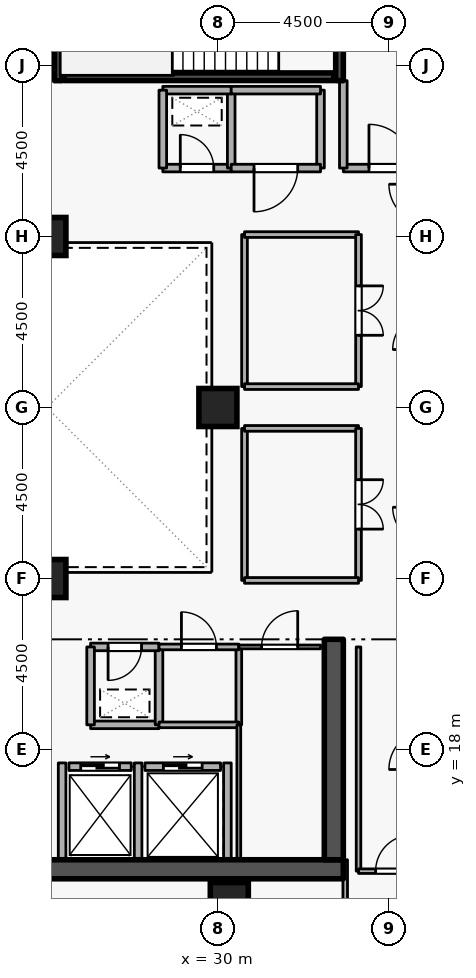
"""IFC4 building model, lengths in metres.
Left out: names, types, materials, properties, quantities, classifications, styles, units other than length and angle.
Written with IfcOpenShell. Run it as: python <this file> out.ifc"""

import sys

from ifc_helpers import new_model, si_unit, direction, frame, frame_2d, origin, origin_2d, place, context, subcontext, project, spatial, rectangle, extrude, element, fill, save


model = new_model("IFC4")
c1 = context("Model", 3, precision=1e-05, world=origin(), true_north=direction((0.0, 1.0)))
c2 = subcontext(c1, "Body", "Model", "MODEL_VIEW")
j1 = project(units=[si_unit("LENGTHUNIT", "METRE"), si_unit("PLANEANGLEUNIT", "RADIAN")], contexts=[c1])
p1 = place(None, origin())
s1 = spatial("IfcSite", under=j1, at=p1, CompositionType="ELEMENT")
p2 = place(p1, origin())
s2 = spatial("IfcBuilding", under=s1, at=p2, CompositionType="ELEMENT")
p3 = place(p2, frame((0.0, 0.0, 225.9)))
s3 = spatial("IfcBuildingStorey", under=s2, at=p3, CompositionType="ELEMENT", Elevation=225.9)
p4 = place(p3, frame((17.7, 14.85, 0.0), z_axis=(0.0, 0.0, 1.0), x_axis=(1.0, 0.0, 0.0)))
e1 = element("IfcWall", 1, at=p4, inside=s3, PredefinedType="SHEAR", context=c2, shape_type="SweptSolid", body=[
    extrude(rectangle(XDim=15.6, YDim=0.5, at=frame_2d((7.8, 0.0))), origin(), (0.0, 0.0, 1.0), 3.6),
])
p5 = place(p3, frame((33.05, 15.1, 0.0), z_axis=(0.0, 0.0, 1.0), x_axis=(0.0, 1.0, 0.0)))
e2 = element("IfcWall", 2, at=p5, inside=s3, PredefinedType="SHEAR", context=c2, shape_type="SweptSolid", body=[
    extrude(rectangle(XDim=5.8, YDim=0.5, at=frame_2d((2.9, 0.0))), origin(), (0.0, 0.0, 1.0), 3.6),
])
for number, where, z_axis, x_axis in (
    (3, (30.3, 14.0, 0.0), (0.0, 0.0, 1.0), (1.0, 0.0, 0.0)),
    (4, (25.5, 22.5, 0.0), (0.0, 0.0, 1.0), (1.0, 0.0, 0.0)),
    (5, (25.5, 31.5, 0.0), (0.0, 0.0, 1.0), (1.0, 0.0, 0.0)),
    (6, (30.0, 27.0, 0.0), (0.0, 0.0, 1.0), (1.0, 0.0, 0.0)),
):
    element("IfcColumn", number, at=place(p3, frame(where, z_axis=z_axis, x_axis=x_axis)), inside=s3, PredefinedType="COLUMN", context=c2, shape_type="SweptSolid", body=[
        extrude(rectangle(XDim=1.0, YDim=1.0, at=origin_2d()), origin(), (0.0, 0.0, 1.0), 3.6),
    ])
p6 = place(p3, frame((26.08, 17.55, 0.0), z_axis=(0.0, 0.0, 1.0), x_axis=(1.0, 0.0, 0.0)))
e7 = element("IfcWall", 7, at=p6, inside=s3, PredefinedType="STANDARD", context=c2, shape_type="SweptSolid", body=[
    extrude(rectangle(XDim=1.64, YDim=0.2, at=frame_2d((0.82, 0.0))), origin(), (0.0, 0.0, 1.0), 3.3),
])
p7 = place(p6, frame((0.31, 0.0, 0.0)))
e8 = element("IfcOpeningElement", 8, at=p7, cuts=e7, PredefinedType="OPENING", context=c2, shape_type="SweptSolid", body=[
    extrude(rectangle(XDim=1.02, YDim=2.06, at=frame_2d((0.51, 1.03))), frame((0.0, 0.11, 0.0), z_axis=(0.0, -1.0, 0.0), x_axis=(1.0, 0.0, 0.0)), (0.0, 0.0, 1.0), 0.22),
])
p8 = place(p3, frame((28.08, 17.55, 0.0), z_axis=(0.0, 0.0, 1.0), x_axis=(1.0, 0.0, 0.0)))
e9 = element("IfcWall", 9, at=p8, inside=s3, PredefinedType="STANDARD", context=c2, shape_type="SweptSolid", body=[
    extrude(rectangle(XDim=1.99, YDim=0.2, at=frame_2d((0.995, 0.0))), origin(), (0.0, 0.0, 1.0), 3.3),
])
p9 = place(p8, frame((0.485, 0.0, 0.0)))
e10 = element("IfcOpeningElement", 10, at=p9, cuts=e9, PredefinedType="OPENING", context=c2, shape_type="SweptSolid", body=[
    extrude(rectangle(XDim=1.02, YDim=2.06, at=frame_2d((0.51, 1.03))), frame((0.0, 0.11, 0.0), z_axis=(0.0, -1.0, 0.0), x_axis=(1.0, 0.0, 0.0)), (0.0, 0.0, 1.0), 0.22),
])
p10 = place(p3, frame((27.9, 15.112, 0.0), z_axis=(0.0, 0.0, 1.0), x_axis=(0.0, 1.0, 0.0)))
e11 = element("IfcWall", 11, at=p10, inside=s3, PredefinedType="STANDARD", context=c2, shape_type="SweptSolid", body=[
    extrude(rectangle(XDim=2.536, YDim=0.2, at=frame_2d((1.268, 0.0))), origin(), (0.0, 0.0, 1.0), 3.3),
])
p11 = place(p3, frame((25.9, 15.112, 0.0), z_axis=(0.0, 0.0, 1.0), x_axis=(0.0, 1.0, 0.0)))
e12 = element("IfcWall", 12, at=p11, inside=s3, PredefinedType="STANDARD", context=c2, shape_type="SweptSolid", body=[
    extrude(rectangle(XDim=2.536, YDim=0.2, at=frame_2d((1.268, 0.0))), origin(), (0.0, 0.0, 1.0), 1.785),
])
p12 = place(p3, frame((30.25, 15.112, 0.0), z_axis=(0.0, 0.0, 1.0), x_axis=(0.0, 1.0, 0.0)))
e13 = element("IfcWall", 13, at=p12, inside=s3, PredefinedType="STANDARD", context=c2, shape_type="SweptSolid", body=[
    extrude(rectangle(XDim=2.536, YDim=0.2, at=frame_2d((1.268, 0.0))), origin(), (0.0, 0.0, 1.0), 3.3),
])
p13 = place(p3, frame((33.2, 38.95, 0.0), z_axis=(0.0, 0.0, 1.0), x_axis=(0.0, -1.0, 0.0)))
e14 = element("IfcWall", 14, at=p13, inside=s3, PredefinedType="SHEAR", context=c2, shape_type="SweptSolid", body=[
    extrude(rectangle(XDim=3.35, YDim=0.2, at=frame_2d((1.675, 0.0))), origin(), (0.0, 0.0, 1.0), 3.6),
])
p14 = place(p13, frame((1.125, 0.0, 0.0)))
e15 = element("IfcOpeningElement", 15, at=p14, cuts=e14, PredefinedType="OPENING", context=c2, shape_type="SweptSolid", body=[
    extrude(rectangle(XDim=1.1, YDim=2.1, at=frame_2d((0.55, 1.05))), frame((0.0, 0.11, 0.0), z_axis=(0.0, -1.0, 0.0), x_axis=(1.0, 0.0, 0.0)), (0.0, 0.0, 1.0), 0.22),
])
p15 = place(p3, frame((25.8, 35.6, 0.0), z_axis=(0.0, 0.0, 1.0), x_axis=(0.0, 1.0, 0.0)))
e16 = element("IfcWall", 16, at=p15, inside=s3, PredefinedType="SHEAR", context=c2, shape_type="SweptSolid", body=[
    extrude(rectangle(XDim=3.35, YDim=0.2, at=frame_2d((1.675, 0.0))), origin(), (0.0, 0.0, 1.0), 3.6),
])
p16 = place(p3, frame((25.95, 35.703, 0.0), z_axis=(0.0, 0.0, 1.0), x_axis=(1.0, 0.0, 0.0)))
e17 = element("IfcWall", 17, at=p16, inside=s3, PredefinedType="SHEAR", context=c2, shape_type="SweptSolid", body=[
    extrude(rectangle(XDim=7.1, YDim=0.2, at=frame_2d((3.55, 0.0))), origin(), (0.0, 0.0, 1.0), 3.6),
])
p17 = place(p3, frame((33.3, 33.3, 0.0), z_axis=(0.0, 0.0, 1.0), x_axis=(1.0, 0.0, 0.0)))
e18 = element("IfcWall", 18, at=p17, inside=s3, PredefinedType="STANDARD", context=c2, shape_type="SweptSolid", body=[
    extrude(rectangle(XDim=2.5, YDim=0.2, at=frame_2d((1.25, 0.0))), origin(), (0.0, 0.0, 1.0), 3.3),
])
p18 = place(p17, frame((0.675, 0.0, 0.0)))
e19 = element("IfcOpeningElement", 19, at=p18, cuts=e18, PredefinedType="OPENING", context=c2, shape_type="SweptSolid", body=[
    extrude(rectangle(XDim=1.15, YDim=2.1, at=frame_2d((0.575, 1.05))), frame((0.0, 0.11, 0.0), z_axis=(0.0, -1.0, 0.0), x_axis=(1.0, 0.0, 0.0)), (0.0, 0.0, 1.0), 0.22),
])
p19 = place(p3, frame((33.3, 35.6, 0.0), z_axis=(0.0, 0.0, 1.0), x_axis=(0.0, -1.0, 0.0)))
e20 = element("IfcWall", 20, at=p19, inside=s3, PredefinedType="STANDARD", context=c2, shape_type="SweptSolid", body=[
    extrude(rectangle(XDim=2.3, YDim=0.2, at=frame_2d((1.15, 0.0))), origin(), (0.0, 0.0, 1.0), 2.505),
])
p20 = place(p3, frame((26.65, 18.65, 0.0), z_axis=(0.0, 0.0, 1.0), x_axis=(1.0, 0.0, 0.0)))
e21 = element("IfcWall", 21, at=p20, inside=s3, PredefinedType="STANDARD", context=c2, shape_type="SweptSolid", body=[
    extrude(rectangle(XDim=1.8, YDim=0.2, at=frame_2d((0.9, 0.0))), origin(), (0.0, 0.0, 1.0), 3.3),
])
p21 = place(p3, frame((28.45, 18.65, 0.0), z_axis=(0.0, 0.0, 1.0), x_axis=(0.0, 1.0, 0.0)))
e22 = element("IfcWall", 22, at=p21, inside=s3, PredefinedType="STANDARD", context=c2, shape_type="SweptSolid", body=[
    extrude(rectangle(XDim=2.05, YDim=0.2, at=frame_2d((1.025, 0.0))), origin(), (0.0, 0.0, 1.0), 3.3),
])
p22 = place(p3, frame((28.45, 20.7, 0.0), z_axis=(0.0, 0.0, 1.0), x_axis=(-1.0, 0.0, 0.0)))
e23 = element("IfcWall", 23, at=p22, inside=s3, PredefinedType="STANDARD", context=c2, shape_type="SweptSolid", body=[
    extrude(rectangle(XDim=1.8, YDim=0.2, at=frame_2d((0.9, 0.0))), origin(), (0.0, 0.0, 1.0), 3.3),
])
p23 = place(p22, frame((0.46, 0.0, 0.0)))
e24 = element("IfcOpeningElement", 24, at=p23, cuts=e23, PredefinedType="OPENING", context=c2, shape_type="SweptSolid", body=[
    extrude(rectangle(XDim=0.88, YDim=2.04, at=frame_2d((0.44, 1.02))), frame((0.0, 0.11, 0.0), z_axis=(0.0, -1.0, 0.0), x_axis=(1.0, 0.0, 0.0)), (0.0, 0.0, 1.0), 0.22),
])
p24 = place(p3, frame((26.65, 20.7, 0.0), z_axis=(0.0, 0.0, 1.0), x_axis=(0.0, -1.0, 0.0)))
e25 = element("IfcWall", 25, at=p24, inside=s3, PredefinedType="STANDARD", context=c2, shape_type="SweptSolid", body=[
    extrude(rectangle(XDim=2.05, YDim=0.2, at=frame_2d((1.025, 0.0))), origin(), (0.0, 0.0, 1.0), 3.3),
])
p25 = place(p3, frame((28.55, 33.3, 0.0), z_axis=(0.0, 0.0, 1.0), x_axis=(1.0, 0.0, 0.0)))
e26 = element("IfcWall", 26, at=p25, inside=s3, PredefinedType="STANDARD", context=c2, shape_type="SweptSolid", body=[
    extrude(rectangle(XDim=1.8, YDim=0.2, at=frame_2d((0.9, 0.0))), origin(), (0.0, 0.0, 1.0), 3.3),
])
p26 = place(p25, frame((0.46, 0.0, 0.0)))
e27 = element("IfcOpeningElement", 27, at=p26, cuts=e26, PredefinedType="OPENING", context=c2, shape_type="SweptSolid", body=[
    extrude(rectangle(XDim=0.88, YDim=2.04, at=frame_2d((0.44, 1.02))), frame((0.0, 0.11, 0.0), z_axis=(0.0, -1.0, 0.0), x_axis=(1.0, 0.0, 0.0)), (0.0, 0.0, 1.0), 0.22),
])
p27 = place(p3, frame((30.35, 33.3, 0.0), z_axis=(0.0, 0.0, 1.0), x_axis=(0.0, 1.0, 0.0)))
e28 = element("IfcWall", 28, at=p27, inside=s3, PredefinedType="STANDARD", context=c2, shape_type="SweptSolid", body=[
    extrude(rectangle(XDim=2.05, YDim=0.2, at=frame_2d((1.025, 0.0))), origin(), (0.0, 0.0, 1.0), 3.3),
])
p28 = place(p3, frame((30.35, 35.35, 0.0), z_axis=(0.0, 0.0, 1.0), x_axis=(-1.0, 0.0, 0.0)))
e29 = element("IfcWall", 29, at=p28, inside=s3, PredefinedType="STANDARD", context=c2, shape_type="SweptSolid", body=[
    extrude(rectangle(XDim=1.8, YDim=0.2, at=frame_2d((0.9, 0.0))), origin(), (0.0, 0.0, 1.0), 3.3),
])
p29 = place(p3, frame((28.55, 35.35, 0.0), z_axis=(0.0, 0.0, 1.0), x_axis=(0.0, -1.0, 0.0)))
e30 = element("IfcWall", 30, at=p29, inside=s3, PredefinedType="STANDARD", context=c2, shape_type="SweptSolid", body=[
    extrude(rectangle(XDim=2.05, YDim=0.2, at=frame_2d((1.025, 0.0))), origin(), (0.0, 0.0, 1.0), 3.3),
])
p30 = place(p3, frame((32.7, 35.35, 0.0), z_axis=(0.0, 0.0, 1.0), x_axis=(0.0, -1.0, 0.0)))
e31 = element("IfcWall", 31, at=p30, inside=s3, PredefinedType="STANDARD", context=c2, shape_type="SweptSolid", body=[
    extrude(rectangle(XDim=2.05, YDim=0.2, at=frame_2d((1.025, 0.0))), origin(), (0.0, 0.0, 1.0), 2.505),
])
p31 = place(p3, frame((32.7, 33.3, 0.0), z_axis=(0.0, 0.0, 1.0), x_axis=(-1.0, 0.0, 0.0)))
e32 = element("IfcWall", 32, at=p31, inside=s3, PredefinedType="STANDARD", context=c2, shape_type="SweptSolid", body=[
    extrude(rectangle(XDim=2.35, YDim=0.2, at=frame_2d((1.175, 0.0))), origin(), (0.0, 0.0, 1.0), 3.3),
])
p32 = place(p31, frame((0.6, 0.0, 0.0)))
e33 = element("IfcOpeningElement", 33, at=p32, cuts=e32, PredefinedType="OPENING", context=c2, shape_type="SweptSolid", body=[
    extrude(rectangle(XDim=1.15, YDim=2.1, at=frame_2d((0.575, 1.05))), frame((0.0, 0.11, 0.0), z_axis=(0.0, -1.0, 0.0), x_axis=(1.0, 0.0, 0.0)), (0.0, 0.0, 1.0), 0.22),
])
p33 = place(p3, frame((30.35, 35.35, 0.0), z_axis=(0.0, 0.0, 1.0), x_axis=(1.0, 0.0, 0.0)))
e34 = element("IfcWall", 34, at=p33, inside=s3, PredefinedType="STANDARD", context=c2, shape_type="SweptSolid", body=[
    extrude(rectangle(XDim=2.35, YDim=0.2, at=frame_2d((1.175, 0.0))), origin(), (0.0, 0.0, 1.0), 3.3),
])
p34 = place(p3, frame((30.55, 20.7, 0.0), z_axis=(0.0, 0.0, 1.0), x_axis=(0.0, -1.0, 0.0)))
e35 = element("IfcWall", 35, at=p34, inside=s3, PredefinedType="PARTITIONING", context=c2, shape_type="SweptSolid", body=[
    extrude(rectangle(XDim=2.05, YDim=0.15, at=frame_2d((1.025, 0.0))), origin(), (0.0, 0.0, 1.0), 3.3),
])
p35 = place(p3, frame((30.55, 18.65, 0.0), z_axis=(0.0, 0.0, 1.0), x_axis=(-1.0, 0.0, 0.0)))
e36 = element("IfcWall", 36, at=p35, inside=s3, PredefinedType="PARTITIONING", context=c2, shape_type="SweptSolid", body=[
    extrude(rectangle(XDim=2.1, YDim=0.15, at=frame_2d((1.05, 0.0))), origin(), (0.0, 0.0, 1.0), 3.3),
])
p36 = place(p3, frame((28.45, 20.7, 0.0), z_axis=(0.0, 0.0, 1.0), x_axis=(1.0, 0.0, 0.0)))
e37 = element("IfcWall", 37, at=p36, inside=s3, PredefinedType="PARTITIONING", context=c2, shape_type="SweptSolid", body=[
    extrude(rectangle(XDim=2.1, YDim=0.15, at=frame_2d((1.05, 0.0))), origin(), (0.0, 0.0, 1.0), 3.3),
])
p37 = place(p36, frame((0.59, 0.0, 0.0)))
e38 = element("IfcOpeningElement", 38, at=p37, cuts=e37, PredefinedType="OPENING", context=c2, shape_type="SweptSolid", body=[
    extrude(rectangle(XDim=0.92, YDim=2.08, at=frame_2d((0.46, 1.04))), frame((0.0, 0.085, 0.0), z_axis=(0.0, -1.0, 0.0), x_axis=(1.0, 0.0, 0.0)), (0.0, 0.0, 1.0), 0.17),
])
p38 = place(p3, frame((30.55, 15.1, 0.0), z_axis=(0.0, 0.0, 1.0), x_axis=(0.0, 1.0, 0.0)))
e39 = element("IfcWall", 39, at=p38, inside=s3, PredefinedType="PARTITIONING", context=c2, shape_type="SweptSolid", body=[
    extrude(rectangle(XDim=3.55, YDim=0.1, at=frame_2d((1.775, 0.0))), origin(), (0.0, 0.0, 1.0), 3.3),
])
p39 = place(p3, frame((30.55, 20.7, 0.0), z_axis=(0.0, 0.0, 1.0), x_axis=(1.0, 0.0, 0.0)))
e40 = element("IfcWall", 40, at=p39, inside=s3, PredefinedType="PARTITIONING", context=c2, shape_type="SweptSolid", body=[
    extrude(rectangle(XDim=2.15, YDim=0.1, at=frame_2d((1.075, 0.0))), origin(), (0.0, 0.0, 1.0), 3.3),
])
p40 = place(p39, frame((0.6, 0.0, 0.0)))
e41 = element("IfcOpeningElement", 41, at=p40, cuts=e40, PredefinedType="OPENING", context=c2, shape_type="SweptSolid", body=[
    extrude(rectangle(XDim=0.95, YDim=2.1, at=frame_2d((0.475, 1.05))), frame((0.0, 0.06, 0.0), z_axis=(0.0, -1.0, 0.0), x_axis=(1.0, 0.0, 0.0)), (0.0, 0.0, 1.0), 0.12),
])
p41 = place(p3, frame((33.7, 20.7, 0.0), z_axis=(0.0, 0.0, 1.0), x_axis=(0.0, -1.0, 0.0)))
e42 = element("IfcWall", 42, at=p41, inside=s3, PredefinedType="PARTITIONING", context=c2, shape_type="SweptSolid", body=[
    extrude(rectangle(XDim=5.9, YDim=0.12, at=frame_2d((2.95, 0.0))), origin(), (0.0, 0.0, 1.0), 3.3),
])
p42 = place(p3, frame((33.7, 14.8, 0.0), z_axis=(0.0, 0.0, 1.0), x_axis=(1.0, 0.0, 0.0)))
e43 = element("IfcWall", 43, at=p42, inside=s3, PredefinedType="PARTITIONING", context=c2, shape_type="SweptSolid", body=[
    extrude(rectangle(XDim=1.85, YDim=0.12, at=frame_2d((0.925, 0.0))), origin(), (0.0, 0.0, 1.0), 3.3),
])
p43 = place(p42, frame((0.45, 0.0, 0.0)))
e44 = element("IfcOpeningElement", 44, at=p43, cuts=e43, PredefinedType="OPENING", context=c2, shape_type="SweptSolid", body=[
    extrude(rectangle(XDim=0.95, YDim=2.1, at=frame_2d((0.475, 1.05))), frame((0.0, 0.07, 0.0), z_axis=(0.0, -1.0, 0.0), x_axis=(1.0, 0.0, 0.0)), (0.0, 0.0, 1.0), 0.14),
])
p44 = place(p3, frame((33.35, 9.28, 0.0), z_axis=(0.0, 0.0, 1.0), x_axis=(0.0, 1.0, 0.0)))
e45 = element("IfcWall", 45, at=p44, inside=s3, PredefinedType="PARTITIONING", context=c2, shape_type="SweptSolid", body=[
    extrude(rectangle(XDim=5.82, YDim=0.12, at=frame_2d((2.91, 0.0))), origin(), (0.0, 0.0, 1.0), 2.505),
])
p45 = place(p3, frame((30.7, 22.45, 0.0), z_axis=(0.0, 0.0, 1.0), x_axis=(0.0, 1.0, 0.0)))
e46 = element("IfcWall", 46, at=p45, inside=s3, PredefinedType="PARTITIONING", context=c2, shape_type="SweptSolid", body=[
    extrude(rectangle(XDim=4.0, YDim=0.15, at=frame_2d((2.0, 0.0))), origin(), (0.0, 0.0, 1.0), 3.3),
])
p46 = place(p3, frame((30.7, 26.45, 0.0), z_axis=(0.0, 0.0, 1.0), x_axis=(1.0, 0.0, 0.0)))
e47 = element("IfcWall", 47, at=p46, inside=s3, PredefinedType="PARTITIONING", context=c2, shape_type="SweptSolid", body=[
    extrude(rectangle(XDim=3.0, YDim=0.15, at=frame_2d((1.5, 0.0))), origin(), (0.0, 0.0, 1.0), 3.3),
])
p47 = place(p3, frame((33.7, 26.45, 0.0), z_axis=(0.0, 0.0, 1.0), x_axis=(0.0, -1.0, 0.0)))
e48 = element("IfcWall", 48, at=p47, inside=s3, PredefinedType="PARTITIONING", context=c2, shape_type="SweptSolid", body=[
    extrude(rectangle(XDim=4.0, YDim=0.15, at=frame_2d((2.0, 0.0))), origin(), (0.0, 0.0, 1.0), 3.3),
])
p48 = place(p47, frame((1.35, 0.0, 0.0)))
e49 = element("IfcOpeningElement", 49, at=p48, cuts=e48, PredefinedType="OPENING", context=c2, shape_type="SweptSolid", body=[
    extrude(rectangle(XDim=1.3, YDim=2.12, at=frame_2d((0.65, 1.06))), frame((0.0, 0.085, 0.0), z_axis=(0.0, -1.0, 0.0), x_axis=(1.0, 0.0, 0.0)), (0.0, 0.0, 1.0), 0.17),
])
p49 = place(p3, frame((33.7, 22.45, 0.0), z_axis=(0.0, 0.0, 1.0), x_axis=(-1.0, 0.0, 0.0)))
e50 = element("IfcWall", 50, at=p49, inside=s3, PredefinedType="PARTITIONING", context=c2, shape_type="SweptSolid", body=[
    extrude(rectangle(XDim=3.0, YDim=0.15, at=frame_2d((1.5, 0.0))), origin(), (0.0, 0.0, 1.0), 3.3),
])
p50 = place(p3, frame((30.7, 27.55, 0.0), z_axis=(0.0, 0.0, 1.0), x_axis=(0.0, 1.0, 0.0)))
e51 = element("IfcWall", 51, at=p50, inside=s3, PredefinedType="PARTITIONING", context=c2, shape_type="SweptSolid", body=[
    extrude(rectangle(XDim=4.0, YDim=0.15, at=frame_2d((2.0, 0.0))), origin(), (0.0, 0.0, 1.0), 3.3),
])
p51 = place(p3, frame((30.7, 31.55, 0.0), z_axis=(0.0, 0.0, 1.0), x_axis=(1.0, 0.0, 0.0)))
e52 = element("IfcWall", 52, at=p51, inside=s3, PredefinedType="PARTITIONING", context=c2, shape_type="SweptSolid", body=[
    extrude(rectangle(XDim=3.0, YDim=0.15, at=frame_2d((1.5, 0.0))), origin(), (0.0, 0.0, 1.0), 3.3),
])
p52 = place(p3, frame((33.7, 31.55, 0.0), z_axis=(0.0, 0.0, 1.0), x_axis=(0.0, -1.0, 0.0)))
e53 = element("IfcWall", 53, at=p52, inside=s3, PredefinedType="PARTITIONING", context=c2, shape_type="SweptSolid", body=[
    extrude(rectangle(XDim=4.0, YDim=0.15, at=frame_2d((2.0, 0.0))), origin(), (0.0, 0.0, 1.0), 3.3),
])
p53 = place(p52, frame((1.35, 0.0, 0.0)))
e54 = element("IfcOpeningElement", 54, at=p53, cuts=e53, PredefinedType="OPENING", context=c2, shape_type="SweptSolid", body=[
    extrude(rectangle(XDim=1.3, YDim=2.12, at=frame_2d((0.65, 1.06))), frame((0.0, 0.085, 0.0), z_axis=(0.0, -1.0, 0.0), x_axis=(1.0, 0.0, 0.0)), (0.0, 0.0, 1.0), 0.17),
])
p54 = place(p3, frame((33.7, 27.55, 0.0), z_axis=(0.0, 0.0, 1.0), x_axis=(-1.0, 0.0, 0.0)))
e55 = element("IfcWall", 55, at=p54, inside=s3, PredefinedType="PARTITIONING", context=c2, shape_type="SweptSolid", body=[
    extrude(rectangle(XDim=3.0, YDim=0.15, at=frame_2d((1.5, 0.0))), origin(), (0.0, 0.0, 1.0), 3.3),
])
p55 = place(p7, origin())
e56 = element("IfcDoor", 56, at=p55, inside=s3, OperationType="SLIDING_TO_LEFT", PredefinedType="DOOR", context=c2, shape_type="SweptSolid", body=[
    extrude(rectangle(XDim=1.02, YDim=2.06, at=frame_2d((0.51, 1.03))), frame((0.0, 0.025, 0.0), z_axis=(0.0, -1.0, 0.0), x_axis=(1.0, 0.0, 0.0)), (0.0, 0.0, 1.0), 0.05),
])
fill(e8, e56)
p56 = place(p9, origin())
e57 = element("IfcDoor", 57, at=p56, inside=s3, OperationType="SLIDING_TO_LEFT", PredefinedType="DOOR", context=c2, shape_type="SweptSolid", body=[
    extrude(rectangle(XDim=1.02, YDim=2.06, at=frame_2d((0.51, 1.03))), frame((0.0, 0.025, 0.0), z_axis=(0.0, -1.0, 0.0), x_axis=(1.0, 0.0, 0.0)), (0.0, 0.0, 1.0), 0.05),
])
fill(e10, e57)
p57 = place(p18, origin())
e58 = element("IfcDoor", 58, at=p57, inside=s3, OperationType="SINGLE_SWING_LEFT", PredefinedType="DOOR", context=c2, shape_type="SweptSolid", body=[
    extrude(rectangle(XDim=1.15, YDim=2.1, at=frame_2d((0.575, 1.05))), frame((0.0, 0.025, 0.0), z_axis=(0.0, -1.0, 0.0), x_axis=(1.0, 0.0, 0.0)), (0.0, 0.0, 1.0), 0.05),
])
fill(e19, e58)
p58 = place(p23, origin())
e59 = element("IfcDoor", 59, at=p58, inside=s3, OperationType="SINGLE_SWING_RIGHT", PredefinedType="DOOR", context=c2, shape_type="SweptSolid", body=[
    extrude(rectangle(XDim=0.88, YDim=2.04, at=frame_2d((0.44, 1.02))), frame((0.0, 0.025, 0.0), z_axis=(0.0, -1.0, 0.0), x_axis=(1.0, 0.0, 0.0)), (0.0, 0.0, 1.0), 0.05),
])
fill(e24, e59)
p59 = place(p26, origin())
e60 = element("IfcDoor", 60, at=p59, inside=s3, OperationType="SINGLE_SWING_LEFT", PredefinedType="DOOR", context=c2, shape_type="SweptSolid", body=[
    extrude(rectangle(XDim=0.88, YDim=2.04, at=frame_2d((0.44, 1.02))), frame((0.0, 0.025, 0.0), z_axis=(0.0, -1.0, 0.0), x_axis=(1.0, 0.0, 0.0)), (0.0, 0.0, 1.0), 0.05),
])
fill(e27, e60)
p60 = place(p37, origin())
e61 = element("IfcDoor", 61, at=p60, inside=s3, OperationType="SINGLE_SWING_LEFT", PredefinedType="DOOR", context=c2, shape_type="SweptSolid", body=[
    extrude(rectangle(XDim=0.92, YDim=2.08, at=frame_2d((0.46, 1.04))), frame((0.0, 0.025, 0.0), z_axis=(0.0, -1.0, 0.0), x_axis=(1.0, 0.0, 0.0)), (0.0, 0.0, 1.0), 0.05),
])
fill(e38, e61)
p61 = place(p40, origin())
e62 = element("IfcDoor", 62, at=p61, inside=s3, OperationType="SINGLE_SWING_RIGHT", PredefinedType="DOOR", context=c2, shape_type="SweptSolid", body=[
    extrude(rectangle(XDim=0.95, YDim=2.1, at=frame_2d((0.475, 1.05))), frame((0.0, 0.025, 0.0), z_axis=(0.0, -1.0, 0.0), x_axis=(1.0, 0.0, 0.0)), (0.0, 0.0, 1.0), 0.05),
])
fill(e41, e62)
p62 = place(p32, origin())
e63 = element("IfcDoor", 63, at=p62, inside=s3, OperationType="SINGLE_SWING_RIGHT", PredefinedType="DOOR", context=c2, shape_type="SweptSolid", body=[
    extrude(rectangle(XDim=1.15, YDim=2.1, at=frame_2d((0.575, 1.05))), frame((0.0, 0.025, 0.0), z_axis=(0.0, -1.0, 0.0), x_axis=(1.0, 0.0, 0.0)), (0.0, 0.0, 1.0), 0.05),
])
fill(e33, e63)
p63 = place(p43, origin())
e64 = element("IfcDoor", 64, at=p63, inside=s3, OperationType="SINGLE_SWING_RIGHT", PredefinedType="DOOR", context=c2, shape_type="SweptSolid", body=[
    extrude(rectangle(XDim=0.95, YDim=2.1, at=frame_2d((0.475, 1.05))), frame((0.0, 0.025, 0.0), z_axis=(0.0, -1.0, 0.0), x_axis=(1.0, 0.0, 0.0)), (0.0, 0.0, 1.0), 0.05),
])
fill(e44, e64)
p64 = place(p48, origin())
e65 = element("IfcDoor", 65, at=p64, inside=s3, OperationType="DOUBLE_DOOR_SINGLE_SWING", PredefinedType="DOOR", context=c2, shape_type="SweptSolid", body=[
    extrude(rectangle(XDim=1.3, YDim=2.12, at=frame_2d((0.65, 1.06))), frame((0.0, 0.025, 0.0), z_axis=(0.0, -1.0, 0.0), x_axis=(1.0, 0.0, 0.0)), (0.0, 0.0, 1.0), 0.05),
])
fill(e49, e65)
p65 = place(p53, origin())
e66 = element("IfcDoor", 66, at=p65, inside=s3, OperationType="DOUBLE_DOOR_SINGLE_SWING", PredefinedType="DOOR", context=c2, shape_type="SweptSolid", body=[
    extrude(rectangle(XDim=1.3, YDim=2.12, at=frame_2d((0.65, 1.06))), frame((0.0, 0.025, 0.0), z_axis=(0.0, -1.0, 0.0), x_axis=(1.0, 0.0, 0.0)), (0.0, 0.0, 1.0), 0.05),
])
fill(e54, e66)
save(model, sys.argv[1])
